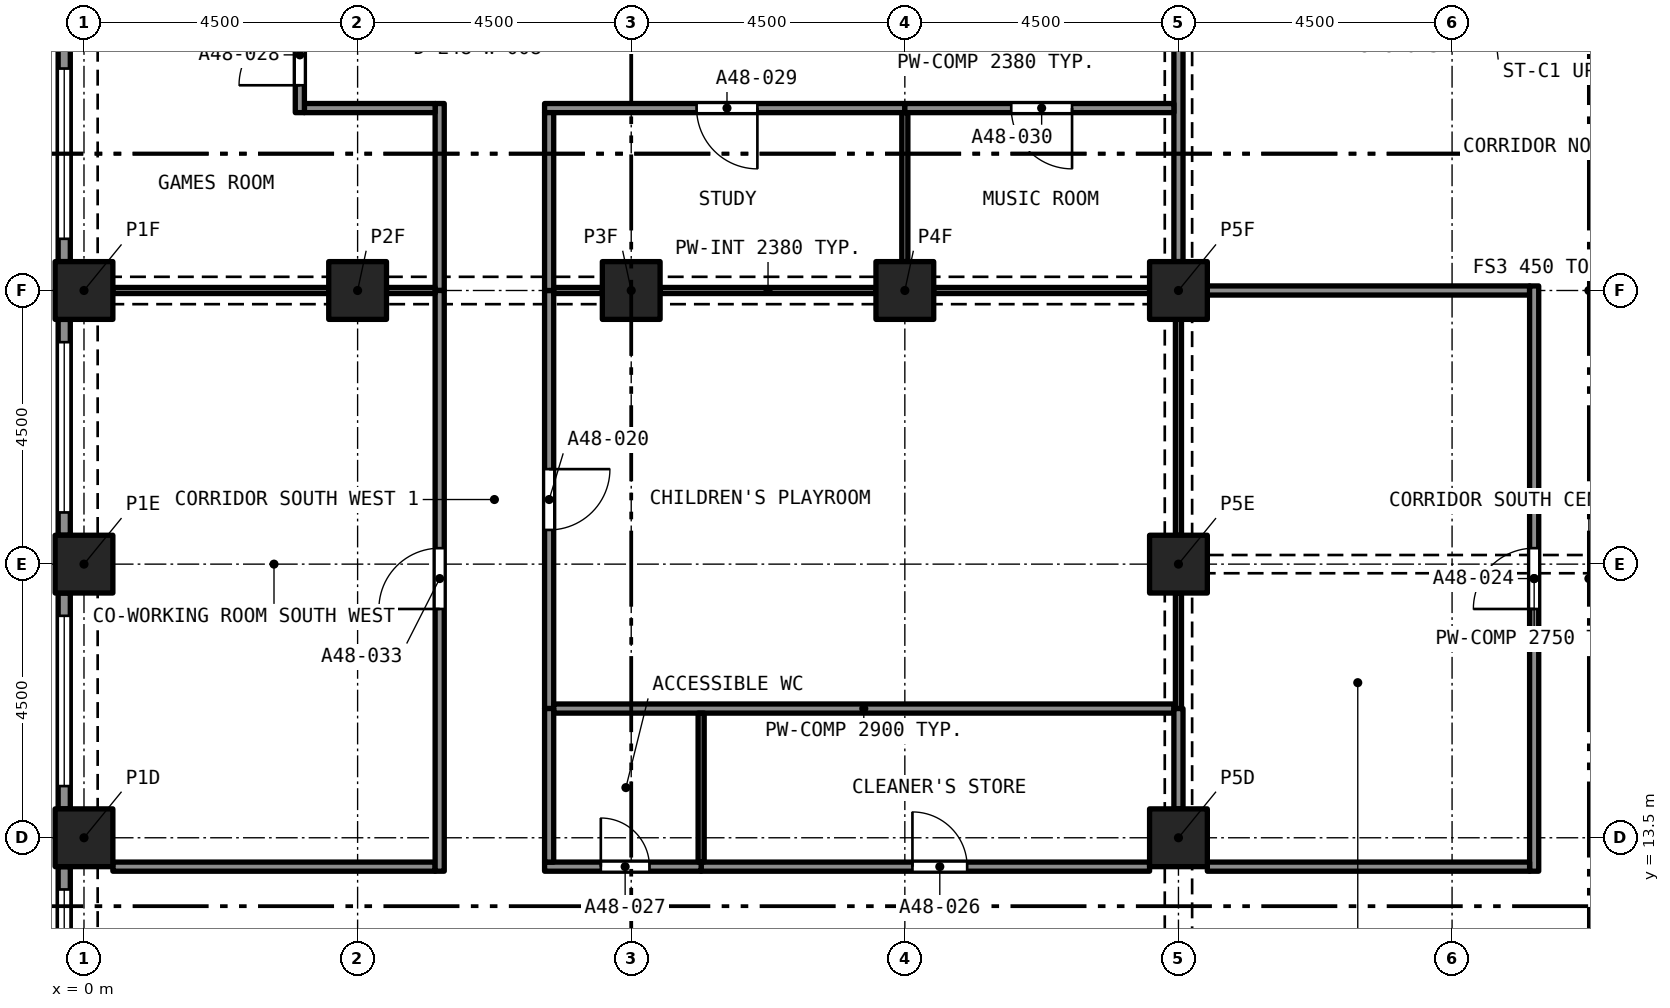
"""IFC4 building model, lengths in metres.
Left out: names, types, materials, properties, quantities, classifications, styles, units other than length and angle.
Written with IfcOpenShell. Run it as: python <this file> out.ifc"""

import sys

from ifc_helpers import new_model, si_unit, direction, frame, frame_2d, origin, origin_2d, place, context, subcontext, project, spatial, rectangle, extrude, element, fill, save


model = new_model("IFC4")
c1 = context("Model", 3, precision=1e-05, world=origin(), true_north=direction((0.0, 1.0)))
c2 = subcontext(c1, "Body", "Model", "MODEL_VIEW")
j1 = project(units=[si_unit("LENGTHUNIT", "METRE"), si_unit("PLANEANGLEUNIT", "RADIAN")], contexts=[c1])
p1 = place(None, origin())
s1 = spatial("IfcSite", under=j1, at=p1, CompositionType="ELEMENT")
p2 = place(p1, origin())
s2 = spatial("IfcBuilding", under=s1, at=p2, CompositionType="ELEMENT")
p3 = place(p2, frame((0.0, 0.0, 176.3)))
s3 = spatial("IfcBuildingStorey", under=s2, at=p3, CompositionType="ELEMENT", Elevation=176.3)
for number, where, z_axis, x_axis in (
    (1, (0.0, 13.5, 0.0), (0.0, 0.0, 1.0), (1.0, 0.0, 0.0)),
    (2, (18.0, 13.5, 0.0), (0.0, 0.0, 1.0), (1.0, 0.0, 0.0)),
    (3, (0.0, 18.0, 0.0), (0.0, 0.0, 1.0), (1.0, 0.0, 0.0)),
    (4, (18.0, 18.0, 0.0), (0.0, 0.0, 1.0), (1.0, 0.0, 0.0)),
    (5, (0.0, 22.5, 0.0), (0.0, 0.0, 1.0), (1.0, 0.0, 0.0)),
    (6, (4.5, 22.5, 0.0), (0.0, 0.0, 1.0), (1.0, 0.0, 0.0)),
    (7, (9.0, 22.5, 0.0), (0.0, 0.0, 1.0), (1.0, 0.0, 0.0)),
    (8, (13.5, 22.5, 0.0), (0.0, 0.0, 1.0), (1.0, 0.0, 0.0)),
    (9, (18.0, 22.5, 0.0), (0.0, 0.0, 1.0), (1.0, 0.0, 0.0)),
):
    element("IfcColumn", number, at=place(p3, frame(where, z_axis=z_axis, x_axis=x_axis)), inside=s3, PredefinedType="COLUMN", context=c2, shape_type="SweptSolid", body=[
        extrude(rectangle(XDim=0.95, YDim=0.95, at=origin_2d()), origin(), (0.0, 0.0, 1.0), 3.2),
    ])
p4 = place(p3, frame((-0.325, 22.975, 0.0), z_axis=(0.0, 0.0, 1.0), x_axis=(0.0, 1.0, 0.0)))
e10 = element("IfcWall", 10, at=p4, inside=s3, PredefinedType="SOLIDWALL", context=c2, shape_type="SweptSolid", body=[
    extrude(rectangle(XDim=3.55, YDim=0.2, at=frame_2d((1.775, 0.0))), origin(), (0.0, 0.0, 1.0), 3.2),
])
p5 = place(p4, frame((0.375, 0.0, 0.45)))
e11 = element("IfcOpeningElement", 11, at=p5, cuts=e10, PredefinedType="OPENING", context=c2, shape_type="SweptSolid", body=[
    extrude(rectangle(XDim=2.8, YDim=1.95, at=frame_2d((1.4, 0.975))), frame((0.0, 0.11, 0.0), z_axis=(0.0, -1.0, 0.0), x_axis=(1.0, 0.0, 0.0)), (0.0, 0.0, 1.0), 0.22),
])
p6 = place(p3, frame((-0.325, 18.475, 0.0), z_axis=(0.0, 0.0, 1.0), x_axis=(0.0, 1.0, 0.0)))
e12 = element("IfcWall", 12, at=p6, inside=s3, PredefinedType="SOLIDWALL", context=c2, shape_type="SweptSolid", body=[
    extrude(rectangle(XDim=3.55, YDim=0.2, at=frame_2d((1.775, 0.0))), origin(), (0.0, 0.0, 1.0), 3.2),
])
p7 = place(p6, frame((0.375, 0.0, 0.45)))
e13 = element("IfcOpeningElement", 13, at=p7, cuts=e12, PredefinedType="OPENING", context=c2, shape_type="SweptSolid", body=[
    extrude(rectangle(XDim=2.8, YDim=1.95, at=frame_2d((1.4, 0.975))), frame((0.0, 0.11, 0.0), z_axis=(0.0, -1.0, 0.0), x_axis=(1.0, 0.0, 0.0)), (0.0, 0.0, 1.0), 0.22),
])
p8 = place(p3, frame((-0.325, 13.975, 0.0), z_axis=(0.0, 0.0, 1.0), x_axis=(0.0, 1.0, 0.0)))
e14 = element("IfcWall", 14, at=p8, inside=s3, PredefinedType="SOLIDWALL", context=c2, shape_type="SweptSolid", body=[
    extrude(rectangle(XDim=3.55, YDim=0.2, at=frame_2d((1.775, 0.0))), origin(), (0.0, 0.0, 1.0), 3.2),
])
p9 = place(p8, frame((0.375, 0.0, 0.45)))
e15 = element("IfcOpeningElement", 15, at=p9, cuts=e14, PredefinedType="OPENING", context=c2, shape_type="SweptSolid", body=[
    extrude(rectangle(XDim=2.8, YDim=1.95, at=frame_2d((1.4, 0.975))), frame((0.0, 0.11, 0.0), z_axis=(0.0, -1.0, 0.0), x_axis=(1.0, 0.0, 0.0)), (0.0, 0.0, 1.0), 0.22),
])
p10 = place(p3, frame((-0.325, 9.475, 0.0), z_axis=(0.0, 0.0, 1.0), x_axis=(0.0, 1.0, 0.0)))
e16 = element("IfcWall", 16, at=p10, inside=s3, PredefinedType="SOLIDWALL", context=c2, shape_type="SweptSolid", body=[
    extrude(rectangle(XDim=3.55, YDim=0.2, at=frame_2d((1.775, 0.0))), origin(), (0.0, 0.0, 1.0), 3.2),
])
p11 = place(p10, frame((0.375, 0.0, 0.45)))
e17 = element("IfcOpeningElement", 17, at=p11, cuts=e16, PredefinedType="OPENING", context=c2, shape_type="SweptSolid", body=[
    extrude(rectangle(XDim=2.8, YDim=1.95, at=frame_2d((1.4, 0.975))), frame((0.0, 0.11, 0.0), z_axis=(0.0, -1.0, 0.0), x_axis=(1.0, 0.0, 0.0)), (0.0, 0.0, 1.0), 0.22),
])
p12 = place(p3, frame((18.0, 18.475, 0.0), z_axis=(0.0, 0.0, 1.0), x_axis=(0.0, 1.0, 0.0)))
e18 = element("IfcWall", 18, at=p12, inside=s3, PredefinedType="PARTITIONING", context=c2, shape_type="SweptSolid", body=[
    extrude(rectangle(XDim=3.55, YDim=0.1, at=frame_2d((1.775, 0.0))), origin(), (0.0, 0.0, 1.0), 2.38),
])
p13 = place(p3, frame((18.0, 15.625, 0.0), z_axis=(0.0, 0.0, 1.0), x_axis=(0.0, 1.0, 0.0)))
e19 = element("IfcWall", 19, at=p13, inside=s3, PredefinedType="PARTITIONING", context=c2, shape_type="SweptSolid", body=[
    extrude(rectangle(XDim=1.9, YDim=0.1, at=frame_2d((0.95, 0.0))), origin(), (0.0, 0.0, 1.0), 2.38),
])
p14 = place(p3, frame((7.65, 22.5, 0.0), z_axis=(0.0, 0.0, 1.0), x_axis=(0.0, -1.0, 0.0)))
e20 = element("IfcWall", 20, at=p14, inside=s3, PredefinedType="PARTITIONING", context=c2, shape_type="SweptSolid", body=[
    extrude(rectangle(XDim=6.875, YDim=0.15, at=frame_2d((3.438, 0.0))), origin(), (0.0, 0.0, 1.0), 2.9),
])
p15 = place(p14, frame((2.938, 0.0, 0.0)))
e21 = element("IfcOpeningElement", 21, at=p15, cuts=e20, PredefinedType="OPENING", context=c2, shape_type="SweptSolid", body=[
    extrude(rectangle(XDim=1.0, YDim=2.1, at=frame_2d((0.5, 1.05))), frame((0.0, 0.085, 0.0), z_axis=(0.0, -1.0, 0.0), x_axis=(1.0, 0.0, 0.0)), (0.0, 0.0, 1.0), 0.17),
])
p16 = place(p3, frame((7.725, 22.5, 0.0), z_axis=(0.0, 0.0, 1.0), x_axis=(1.0, 0.0, 0.0)))
e22 = element("IfcWall", 22, at=p16, inside=s3, PredefinedType="PARTITIONING", context=c2, shape_type="SweptSolid", body=[
    extrude(rectangle(XDim=0.8, YDim=0.1, at=frame_2d((0.4, 0.0))), origin(), (0.0, 0.0, 1.0), 2.38),
])
for number, where, z_axis, x_axis in (
    (23, (9.475, 22.5, 0.0), (0.0, 0.0, 1.0), (1.0, 0.0, 0.0)),
    (24, (13.975, 22.5, 0.0), (0.0, 0.0, 1.0), (1.0, 0.0, 0.0)),
):
    element("IfcWall", number, at=place(p3, frame(where, z_axis=z_axis, x_axis=x_axis)), inside=s3, PredefinedType="PARTITIONING", context=c2, shape_type="SweptSolid", body=[
        extrude(rectangle(XDim=3.55, YDim=0.1, at=frame_2d((1.775, 0.0))), origin(), (0.0, 0.0, 1.0), 2.38),
    ])
p17 = place(p3, frame((7.725, 15.625, 0.0), z_axis=(0.0, 0.0, 1.0), x_axis=(1.0, 0.0, 0.0)))
e25 = element("IfcWall", 25, at=p17, inside=s3, PredefinedType="PARTITIONING", context=c2, shape_type="SweptSolid", body=[
    extrude(rectangle(XDim=10.2, YDim=0.15, at=frame_2d((5.1, 0.0))), origin(), (0.0, 0.0, 1.0), 2.9),
])
p18 = place(p3, frame((18.475, 22.5, 0.0), z_axis=(0.0, 0.0, 1.0), x_axis=(1.0, 0.0, 0.0)))
e26 = element("IfcWall", 26, at=p18, inside=s3, PredefinedType="PARTITIONING", context=c2, shape_type="SweptSolid", body=[
    extrude(rectangle(XDim=5.3, YDim=0.15, at=frame_2d((2.65, 0.0))), origin(), (0.0, 0.0, 1.0), 2.75),
])
p19 = place(p3, frame((18.0, 22.975, 0.0), z_axis=(0.0, 0.0, 1.0), x_axis=(0.0, 1.0, 0.0)))
e27 = element("IfcWall", 27, at=p19, inside=s3, PredefinedType="PARTITIONING", context=c2, shape_type="SweptSolid", body=[
    extrude(rectangle(XDim=3.55, YDim=0.15, at=frame_2d((1.775, 0.0))), origin(), (0.0, 0.0, 1.0), 2.38),
])
p20 = place(p3, frame((23.85, 12.95, 0.0), z_axis=(0.0, 0.0, 1.0), x_axis=(0.0, 1.0, 0.0)))
e28 = element("IfcWall", 28, at=p20, inside=s3, PredefinedType="PARTITIONING", context=c2, shape_type="SweptSolid", body=[
    extrude(rectangle(XDim=9.625, YDim=0.15, at=frame_2d((4.812, 0.0))), origin(), (0.0, 0.0, 1.0), 2.75),
])
p21 = place(p20, frame((4.312, 0.0, 0.0)))
e29 = element("IfcOpeningElement", 29, at=p21, cuts=e28, PredefinedType="OPENING", context=c2, shape_type="SweptSolid", body=[
    extrude(rectangle(XDim=1.0, YDim=2.1, at=frame_2d((0.5, 1.05))), frame((0.0, 0.085, 0.0), z_axis=(0.0, -1.0, 0.0), x_axis=(1.0, 0.0, 0.0)), (0.0, 0.0, 1.0), 0.17),
])
p22 = place(p3, frame((18.475, 13.025, 0.0), z_axis=(0.0, 0.0, 1.0), x_axis=(1.0, 0.0, 0.0)))
e30 = element("IfcWall", 30, at=p22, inside=s3, PredefinedType="PARTITIONING", context=c2, shape_type="SweptSolid", body=[
    extrude(rectangle(XDim=5.3, YDim=0.15, at=frame_2d((2.65, 0.0))), origin(), (0.0, 0.0, 1.0), 2.75),
])
p23 = place(p3, frame((10.15, 13.025, 0.0), z_axis=(0.0, 0.0, 1.0), x_axis=(1.0, 0.0, 0.0)))
e31 = element("IfcWall", 31, at=p23, inside=s3, PredefinedType="PARTITIONING", context=c2, shape_type="SweptSolid", body=[
    extrude(rectangle(XDim=7.375, YDim=0.15, at=frame_2d((3.688, 0.0))), origin(), (0.0, 0.0, 1.0), 2.9),
])
p24 = place(p23, frame((3.475, 0.0, 0.0)))
e32 = element("IfcOpeningElement", 32, at=p24, cuts=e31, PredefinedType="OPENING", context=c2, shape_type="SweptSolid", body=[
    extrude(rectangle(XDim=0.9, YDim=2.1, at=frame_2d((0.45, 1.05))), frame((0.0, 0.085, 0.0), z_axis=(0.0, -1.0, 0.0), x_axis=(1.0, 0.0, 0.0)), (0.0, 0.0, 1.0), 0.17),
])
p25 = place(p3, frame((7.575, 13.025, 0.0), z_axis=(0.0, 0.0, 1.0), x_axis=(1.0, 0.0, 0.0)))
e33 = element("IfcWall", 33, at=p25, inside=s3, PredefinedType="PARTITIONING", context=c2, shape_type="SweptSolid", body=[
    extrude(rectangle(XDim=2.575, YDim=0.15, at=frame_2d((1.288, 0.0))), origin(), (0.0, 0.0, 1.0), 2.9),
])
p26 = place(p25, frame((0.925, 0.0, 0.0)))
e34 = element("IfcOpeningElement", 34, at=p26, cuts=e33, PredefinedType="OPENING", context=c2, shape_type="SweptSolid", body=[
    extrude(rectangle(XDim=0.8, YDim=2.1, at=frame_2d((0.4, 1.05))), frame((0.0, 0.085, 0.0), z_axis=(0.0, -1.0, 0.0), x_axis=(1.0, 0.0, 0.0)), (0.0, 0.0, 1.0), 0.17),
])
p27 = place(p3, frame((0.475, 13.025, 0.0), z_axis=(0.0, 0.0, 1.0), x_axis=(1.0, 0.0, 0.0)))
e35 = element("IfcWall", 35, at=p27, inside=s3, PredefinedType="PARTITIONING", context=c2, shape_type="SweptSolid", body=[
    extrude(rectangle(XDim=5.3, YDim=0.15, at=frame_2d((2.65, 0.0))), origin(), (0.0, 0.0, 1.0), 2.9),
])
p28 = place(p3, frame((18.0, 13.975, 0.0), z_axis=(0.0, 0.0, 1.0), x_axis=(0.0, 1.0, 0.0)))
e36 = element("IfcWall", 36, at=p28, inside=s3, PredefinedType="PARTITIONING", context=c2, shape_type="SweptSolid", body=[
    extrude(rectangle(XDim=1.65, YDim=0.15, at=frame_2d((0.825, 0.0))), origin(), (0.0, 0.0, 1.0), 2.38),
])
p29 = place(p3, frame((5.85, 22.5, 0.0), z_axis=(0.0, 0.0, 1.0), x_axis=(0.0, 1.0, 0.0)))
e37 = element("IfcWall", 37, at=p29, inside=s3, PredefinedType="PARTITIONING", context=c2, shape_type="SweptSolid", body=[
    extrude(rectangle(XDim=3.075, YDim=0.15, at=frame_2d((1.538, 0.0))), origin(), (0.0, 0.0, 1.0), 2.9),
])
p30 = place(p3, frame((3.625, 25.5, 0.0), z_axis=(0.0, 0.0, 1.0), x_axis=(1.0, 0.0, 0.0)))
e38 = element("IfcWall", 38, at=p30, inside=s3, PredefinedType="PARTITIONING", context=c2, shape_type="SweptSolid", body=[
    extrude(rectangle(XDim=2.15, YDim=0.15, at=frame_2d((1.075, 0.0))), origin(), (0.0, 0.0, 1.0), 2.9),
])
p31 = place(p3, frame((3.55, 25.425, 0.0), z_axis=(0.0, 0.0, 1.0), x_axis=(0.0, 1.0, 0.0)))
e39 = element("IfcWall", 39, at=p31, inside=s3, PredefinedType="PARTITIONING", context=c2, shape_type="SweptSolid", body=[
    extrude(rectangle(XDim=1.825, YDim=0.15, at=frame_2d((0.913, 0.0))), origin(), (0.0, 0.0, 1.0), 2.9),
])
p32 = place(p31, frame((0.45, 0.0, 0.0)))
e40 = element("IfcOpeningElement", 40, at=p32, cuts=e39, PredefinedType="OPENING", context=c2, shape_type="SweptSolid", body=[
    extrude(rectangle(XDim=1.0, YDim=2.1, at=frame_2d((0.5, 1.05))), frame((0.0, 0.085, 0.0), z_axis=(0.0, -1.0, 0.0), x_axis=(1.0, 0.0, 0.0)), (0.0, 0.0, 1.0), 0.17),
])
p33 = place(p3, frame((13.5, 25.5, 0.0), z_axis=(0.0, 0.0, 1.0), x_axis=(-1.0, 0.0, 0.0)))
e41 = element("IfcWall", 41, at=p33, inside=s3, PredefinedType="PARTITIONING", context=c2, shape_type="SweptSolid", body=[
    extrude(rectangle(XDim=5.925, YDim=0.15, at=frame_2d((2.962, 0.0))), origin(), (0.0, 0.0, 1.0), 2.9),
])
p34 = place(p33, frame((2.425, 0.0, 0.0)))
e42 = element("IfcOpeningElement", 42, at=p34, cuts=e41, PredefinedType="OPENING", context=c2, shape_type="SweptSolid", body=[
    extrude(rectangle(XDim=1.0, YDim=2.1, at=frame_2d((0.5, 1.05))), frame((0.0, 0.085, 0.0), z_axis=(0.0, -1.0, 0.0), x_axis=(1.0, 0.0, 0.0)), (0.0, 0.0, 1.0), 0.17),
])
p35 = place(p3, frame((7.65, 22.5, 0.0), z_axis=(0.0, 0.0, 1.0), x_axis=(0.0, 1.0, 0.0)))
e43 = element("IfcWall", 43, at=p35, inside=s3, PredefinedType="PARTITIONING", context=c2, shape_type="SweptSolid", body=[
    extrude(rectangle(XDim=2.925, YDim=0.15, at=frame_2d((1.462, 0.0))), origin(), (0.0, 0.0, 1.0), 2.9),
])
p36 = place(p3, frame((17.925, 25.5, 0.0), z_axis=(0.0, 0.0, 1.0), x_axis=(-1.0, 0.0, 0.0)))
e44 = element("IfcWall", 44, at=p36, inside=s3, PredefinedType="PARTITIONING", context=c2, shape_type="SweptSolid", body=[
    extrude(rectangle(XDim=4.425, YDim=0.15, at=frame_2d((2.212, 0.0))), origin(), (0.0, 0.0, 1.0), 2.9),
])
p37 = place(p36, frame((1.675, 0.0, 0.0)))
e45 = element("IfcOpeningElement", 45, at=p37, cuts=e44, PredefinedType="OPENING", context=c2, shape_type="SweptSolid", body=[
    extrude(rectangle(XDim=1.0, YDim=2.1, at=frame_2d((0.5, 1.05))), frame((0.0, 0.085, 0.0), z_axis=(0.0, -1.0, 0.0), x_axis=(1.0, 0.0, 0.0)), (0.0, 0.0, 1.0), 0.17),
])
p38 = place(p3, frame((7.65, 13.1, 0.0), z_axis=(0.0, 0.0, 1.0), x_axis=(0.0, 1.0, 0.0)))
e46 = element("IfcWall", 46, at=p38, inside=s3, PredefinedType="PARTITIONING", context=c2, shape_type="SweptSolid", body=[
    extrude(rectangle(XDim=2.525, YDim=0.15, at=frame_2d((1.262, 0.0))), origin(), (0.0, 0.0, 1.0), 2.9),
])
p39 = place(p3, frame((5.85, 12.95, 0.0), z_axis=(0.0, 0.0, 1.0), x_axis=(0.0, 1.0, 0.0)))
e47 = element("IfcWall", 47, at=p39, inside=s3, PredefinedType="PARTITIONING", context=c2, shape_type="SweptSolid", body=[
    extrude(rectangle(XDim=9.55, YDim=0.15, at=frame_2d((4.775, 0.0))), origin(), (0.0, 0.0, 1.0), 2.9),
])
p40 = place(p39, frame((4.312, 0.0, 0.0)))
e48 = element("IfcOpeningElement", 48, at=p40, cuts=e47, PredefinedType="OPENING", context=c2, shape_type="SweptSolid", body=[
    extrude(rectangle(XDim=1.0, YDim=2.1, at=frame_2d((0.5, 1.05))), frame((0.0, 0.085, 0.0), z_axis=(0.0, -1.0, 0.0), x_axis=(1.0, 0.0, 0.0)), (0.0, 0.0, 1.0), 0.17),
])
p41 = place(p3, frame((4.975, 22.5, 0.0), z_axis=(0.0, 0.0, 1.0), x_axis=(1.0, 0.0, 0.0)))
e49 = element("IfcWall", 49, at=p41, inside=s3, PredefinedType="PARTITIONING", context=c2, shape_type="SweptSolid", body=[
    extrude(rectangle(XDim=0.8, YDim=0.1, at=frame_2d((0.4, 0.0))), origin(), (0.0, 0.0, 1.0), 2.38),
])
p42 = place(p3, frame((0.475, 22.5, 0.0), z_axis=(0.0, 0.0, 1.0), x_axis=(1.0, 0.0, 0.0)))
e50 = element("IfcWall", 50, at=p42, inside=s3, PredefinedType="PARTITIONING", context=c2, shape_type="SweptSolid", body=[
    extrude(rectangle(XDim=3.55, YDim=0.1, at=frame_2d((1.775, 0.0))), origin(), (0.0, 0.0, 1.0), 2.38),
])
for number, where, z_axis, x_axis in (
    (51, (13.5, 22.975, 0.0), (0.0, 0.0, 1.0), (0.0, 1.0, 0.0)),
    (52, (10.15, 13.1, 0.0), (0.0, 0.0, 1.0), (0.0, 1.0, 0.0)),
):
    element("IfcWall", number, at=place(p3, frame(where, z_axis=z_axis, x_axis=x_axis)), inside=s3, PredefinedType="PARTITIONING", context=c2, shape_type="SweptSolid", body=[
        extrude(rectangle(XDim=2.45, YDim=0.1, at=frame_2d((1.225, 0.0))), origin(), (0.0, 0.0, 1.0), 2.9),
    ])
p43 = place(p5, origin())
e53 = element("IfcWindow", 53, at=p43, inside=s3, PartitioningType="SINGLE_PANEL", PredefinedType="WINDOW", context=c2, shape_type="SweptSolid", body=[
    extrude(rectangle(XDim=2.8, YDim=1.95, at=frame_2d((1.4, 0.975))), frame((0.0, 0.03, 0.0), z_axis=(0.0, -1.0, 0.0), x_axis=(1.0, 0.0, 0.0)), (0.0, 0.0, 1.0), 0.06),
])
fill(e11, e53)
p44 = place(p7, origin())
e54 = element("IfcWindow", 54, at=p44, inside=s3, PartitioningType="SINGLE_PANEL", PredefinedType="WINDOW", context=c2, shape_type="SweptSolid", body=[
    extrude(rectangle(XDim=2.8, YDim=1.95, at=frame_2d((1.4, 0.975))), frame((0.0, 0.03, 0.0), z_axis=(0.0, -1.0, 0.0), x_axis=(1.0, 0.0, 0.0)), (0.0, 0.0, 1.0), 0.06),
])
fill(e13, e54)
p45 = place(p9, origin())
e55 = element("IfcWindow", 55, at=p45, inside=s3, PartitioningType="SINGLE_PANEL", PredefinedType="WINDOW", context=c2, shape_type="SweptSolid", body=[
    extrude(rectangle(XDim=2.8, YDim=1.95, at=frame_2d((1.4, 0.975))), frame((0.0, 0.03, 0.0), z_axis=(0.0, -1.0, 0.0), x_axis=(1.0, 0.0, 0.0)), (0.0, 0.0, 1.0), 0.06),
])
fill(e15, e55)
p46 = place(p11, origin())
e56 = element("IfcWindow", 56, at=p46, inside=s3, PartitioningType="SINGLE_PANEL", PredefinedType="WINDOW", context=c2, shape_type="SweptSolid", body=[
    extrude(rectangle(XDim=2.8, YDim=1.95, at=frame_2d((1.4, 0.975))), frame((0.0, 0.03, 0.0), z_axis=(0.0, -1.0, 0.0), x_axis=(1.0, 0.0, 0.0)), (0.0, 0.0, 1.0), 0.06),
])
fill(e17, e56)
p47 = place(p15, origin())
e57 = element("IfcDoor", 57, at=p47, inside=s3, OperationType="SINGLE_SWING_RIGHT", PredefinedType="DOOR", context=c2, shape_type="SweptSolid", body=[
    extrude(rectangle(XDim=1.0, YDim=2.1, at=frame_2d((0.5, 1.05))), frame((0.0, 0.025, 0.0), z_axis=(0.0, -1.0, 0.0), x_axis=(1.0, 0.0, 0.0)), (0.0, 0.0, 1.0), 0.05),
])
fill(e21, e57)
p48 = place(p21, origin())
e58 = element("IfcDoor", 58, at=p48, inside=s3, OperationType="SINGLE_SWING_RIGHT", PredefinedType="DOOR", context=c2, shape_type="SweptSolid", body=[
    extrude(rectangle(XDim=1.0, YDim=2.1, at=frame_2d((0.5, 1.05))), frame((0.0, 0.025, 0.0), z_axis=(0.0, -1.0, 0.0), x_axis=(1.0, 0.0, 0.0)), (0.0, 0.0, 1.0), 0.05),
])
fill(e29, e58)
p49 = place(p24, origin())
e59 = element("IfcDoor", 59, at=p49, inside=s3, OperationType="SINGLE_SWING_RIGHT", PredefinedType="DOOR", context=c2, shape_type="SweptSolid", body=[
    extrude(rectangle(XDim=0.9, YDim=2.1, at=frame_2d((0.45, 1.05))), frame((0.0, 0.025, 0.0), z_axis=(0.0, -1.0, 0.0), x_axis=(1.0, 0.0, 0.0)), (0.0, 0.0, 1.0), 0.05),
])
fill(e32, e59)
p50 = place(p26, origin())
e60 = element("IfcDoor", 60, at=p50, inside=s3, OperationType="SINGLE_SWING_RIGHT", PredefinedType="DOOR", context=c2, shape_type="SweptSolid", body=[
    extrude(rectangle(XDim=0.8, YDim=2.1, at=frame_2d((0.4, 1.05))), frame((0.0, 0.025, 0.0), z_axis=(0.0, -1.0, 0.0), x_axis=(1.0, 0.0, 0.0)), (0.0, 0.0, 1.0), 0.05),
])
fill(e34, e60)
p51 = place(p32, origin())
e61 = element("IfcDoor", 61, at=p51, inside=s3, OperationType="SINGLE_SWING_RIGHT", PredefinedType="DOOR", context=c2, shape_type="SweptSolid", body=[
    extrude(rectangle(XDim=1.0, YDim=2.1, at=frame_2d((0.5, 1.05))), frame((0.0, 0.025, 0.0), z_axis=(0.0, -1.0, 0.0), x_axis=(1.0, 0.0, 0.0)), (0.0, 0.0, 1.0), 0.05),
])
fill(e40, e61)
p52 = place(p34, origin())
e62 = element("IfcDoor", 62, at=p52, inside=s3, OperationType="SINGLE_SWING_LEFT", PredefinedType="DOOR", context=c2, shape_type="SweptSolid", body=[
    extrude(rectangle(XDim=1.0, YDim=2.1, at=frame_2d((0.5, 1.05))), frame((0.0, 0.025, 0.0), z_axis=(0.0, -1.0, 0.0), x_axis=(1.0, 0.0, 0.0)), (0.0, 0.0, 1.0), 0.05),
])
fill(e42, e62)
p53 = place(p37, origin())
e63 = element("IfcDoor", 63, at=p53, inside=s3, OperationType="SINGLE_SWING_LEFT", PredefinedType="DOOR", context=c2, shape_type="SweptSolid", body=[
    extrude(rectangle(XDim=1.0, YDim=2.1, at=frame_2d((0.5, 1.05))), frame((0.0, 0.025, 0.0), z_axis=(0.0, -1.0, 0.0), x_axis=(1.0, 0.0, 0.0)), (0.0, 0.0, 1.0), 0.05),
])
fill(e45, e63)
p54 = place(p40, origin())
e64 = element("IfcDoor", 64, at=p54, inside=s3, OperationType="SINGLE_SWING_RIGHT", PredefinedType="DOOR", context=c2, shape_type="SweptSolid", body=[
    extrude(rectangle(XDim=1.0, YDim=2.1, at=frame_2d((0.5, 1.05))), frame((0.0, 0.025, 0.0), z_axis=(0.0, -1.0, 0.0), x_axis=(1.0, 0.0, 0.0)), (0.0, 0.0, 1.0), 0.05),
])
fill(e48, e64)
save(model, sys.argv[1])
